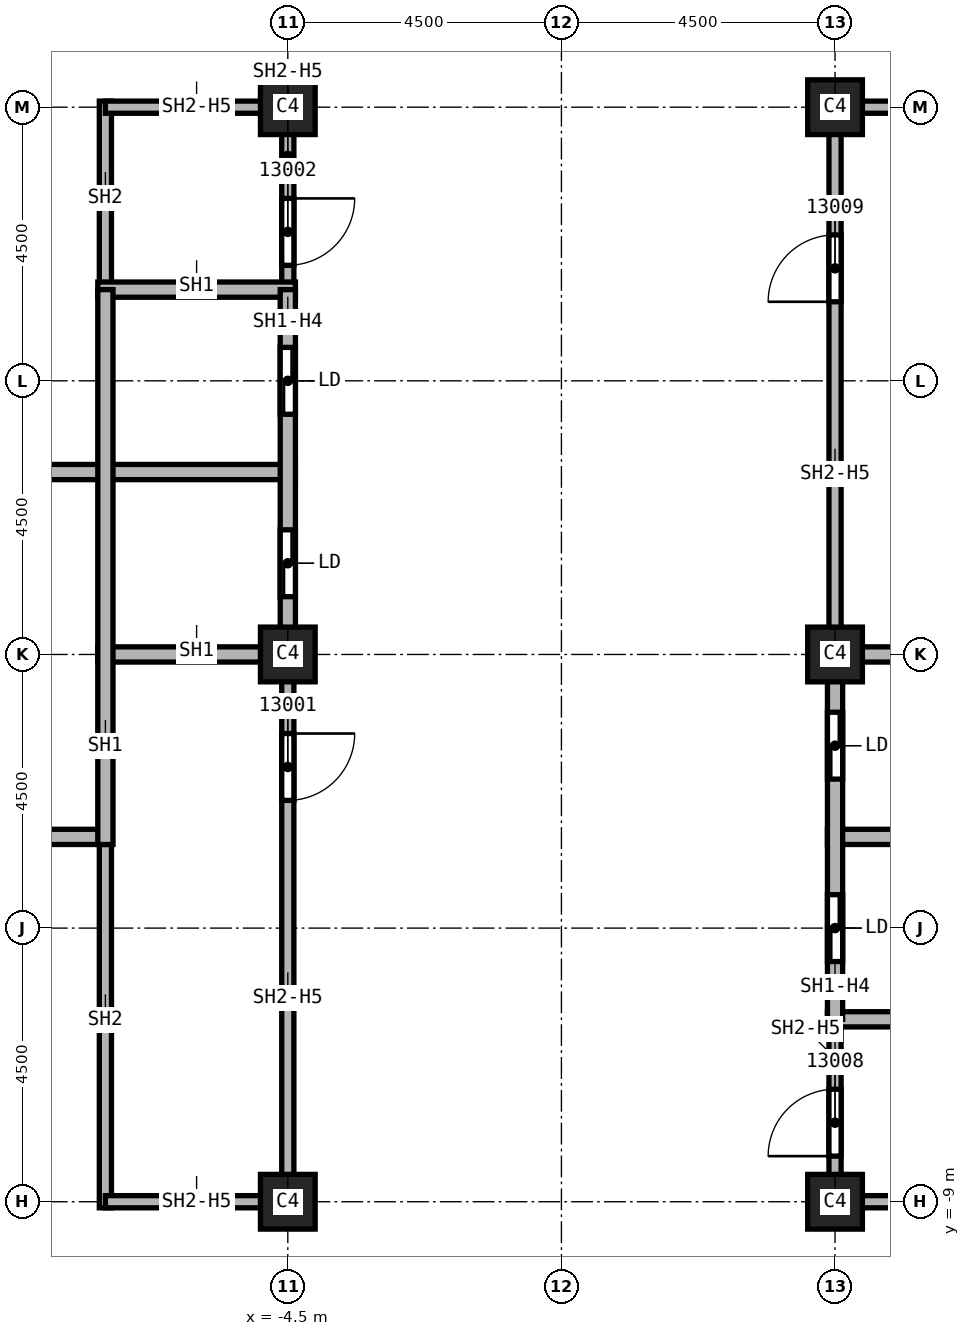
"""IFC4 building model, lengths in metres.
Left out: names, types, materials, properties, quantities, classifications, styles, units other than length and angle.
Written with IfcOpenShell. Run it as: python <this file> out.ifc"""

import sys

from ifc_helpers import new_model, si_unit, direction, frame, frame_2d, origin, origin_2d, place, context, subcontext, project, spatial, rectangle, extrude, element, fill, save


model = new_model("IFC4")
c1 = context("Model", 3, precision=1e-05, world=origin(), true_north=direction((0.0, 1.0)))
c2 = subcontext(c1, "Body", "Model", "MODEL_VIEW")
j1 = project(units=[si_unit("LENGTHUNIT", "METRE"), si_unit("PLANEANGLEUNIT", "RADIAN")], contexts=[c1])
p1 = place(None, origin())
s1 = spatial("IfcSite", under=j1, at=p1, CompositionType="ELEMENT")
p2 = place(p1, origin())
s2 = spatial("IfcBuilding", under=s1, at=p2, CompositionType="ELEMENT")
p3 = place(p2, frame((0.0, 0.0, 208.0)))
s3 = spatial("IfcBuildingStorey", under=s2, at=p3, CompositionType="ELEMENT", Elevation=208.0)
for number, where, z_axis, x_axis in (
    (1, (4.5, 0.0, 0.0), (0.0, 0.0, 1.0), (1.0, 0.0, 0.0)),
    (2, (4.5, 9.0, 0.0), (0.0, 0.0, 1.0), (1.0, 0.0, 0.0)),
    (3, (4.5, -9.0, 0.0), (0.0, 0.0, 1.0), (1.0, 0.0, 0.0)),
    (4, (-4.5, 0.0, 0.0), (0.0, 0.0, 1.0), (1.0, 0.0, 0.0)),
    (5, (-4.5, 9.0, 0.0), (0.0, 0.0, 1.0), (1.0, 0.0, 0.0)),
    (6, (-4.5, -9.0, 0.0), (0.0, 0.0, 1.0), (1.0, 0.0, 0.0)),
):
    element("IfcColumn", number, at=place(p3, frame(where, z_axis=z_axis, x_axis=x_axis)), inside=s3, PredefinedType="COLUMN", context=c2, shape_type="SweptSolid", body=[
        extrude(rectangle(XDim=0.9, YDim=0.9, at=origin_2d()), origin(), (0.0, 0.0, 1.0), 3.72),
    ])
p4 = place(p3, frame((-7.5, -9.1, 0.0), z_axis=(0.0, 0.0, 1.0), x_axis=(0.0, 1.0, 0.0)))
e7 = element("IfcWall", 7, at=p4, inside=s3, PredefinedType="SOLIDWALL", context=c2, shape_type="SweptSolid", body=[
    extrude(rectangle(XDim=6.225, YDim=0.2, at=frame_2d((3.113, 0.0))), origin(), (0.0, 0.0, 1.0), 3.72),
])
p5 = place(p3, frame((-7.5, 6.0, 0.0), z_axis=(0.0, 0.0, 1.0), x_axis=(0.0, 1.0, 0.0)))
e8 = element("IfcWall", 8, at=p5, inside=s3, PredefinedType="SOLIDWALL", context=c2, shape_type="SweptSolid", body=[
    extrude(rectangle(XDim=3.1, YDim=0.2, at=frame_2d((1.55, 0.0))), origin(), (0.0, 0.0, 1.0), 3.72),
])
for number, where, z_axis, x_axis in (
    (9, (-7.5, 9.0, 0.0), (0.0, 0.0, 1.0), (1.0, 0.0, 0.0)),
    (10, (-4.5, -9.0, 0.0), (0.0, 0.0, 1.0), (-1.0, 0.0, 0.0)),
):
    element("IfcWall", number, at=place(p3, frame(where, z_axis=z_axis, x_axis=x_axis)), inside=s3, PredefinedType="SOLIDWALL", context=c2, shape_type="SweptSolid", body=[
        extrude(rectangle(XDim=3.0, YDim=0.2, at=frame_2d((1.5, 0.0))), origin(), (0.0, 0.0, 1.0), 2.958),
    ])
p6 = place(p3, frame((-4.5, 0.0, 0.0), z_axis=(0.0, 0.0, 1.0), x_axis=(0.0, -1.0, 0.0)))
e11 = element("IfcWall", 11, at=p6, inside=s3, PredefinedType="SOLIDWALL", context=c2, shape_type="SweptSolid", body=[
    extrude(rectangle(XDim=9.1, YDim=0.2, at=frame_2d((4.55, 0.0))), origin(), (0.0, 0.0, 1.0), 2.958),
])
p7 = place(p6, frame((1.3, 0.0, 0.0)))
e12 = element("IfcOpeningElement", 12, at=p7, cuts=e11, PredefinedType="OPENING", context=c2, shape_type="SweptSolid", body=[
    extrude(rectangle(XDim=1.1, YDim=2.1, at=frame_2d((0.55, 1.05))), frame((0.0, 0.1, 0.0), z_axis=(0.0, -1.0, 0.0), x_axis=(1.0, 0.0, 0.0)), (0.0, 0.0, 1.0), 0.2),
])
p8 = place(p3, frame((-4.5, 9.1, 0.0), z_axis=(0.0, 0.0, 1.0), x_axis=(0.0, -1.0, 0.0)))
e13 = element("IfcWall", 13, at=p8, inside=s3, PredefinedType="SOLIDWALL", context=c2, shape_type="SweptSolid", body=[
    extrude(rectangle(XDim=3.1, YDim=0.2, at=frame_2d((1.55, 0.0))), origin(), (0.0, 0.0, 1.0), 2.958),
])
p9 = place(p8, frame((1.6, 0.0, 0.0)))
e14 = element("IfcOpeningElement", 14, at=p9, cuts=e13, PredefinedType="OPENING", context=c2, shape_type="SweptSolid", body=[
    extrude(rectangle(XDim=1.1, YDim=2.1, at=frame_2d((0.55, 1.05))), frame((0.0, 0.1, 0.0), z_axis=(0.0, -1.0, 0.0), x_axis=(1.0, 0.0, 0.0)), (0.0, 0.0, 1.0), 0.2),
])
p10 = place(p3, frame((4.5, -9.1, 0.0), z_axis=(0.0, 0.0, 1.0), x_axis=(0.0, 1.0, 0.0)))
e15 = element("IfcWall", 15, at=p10, inside=s3, PredefinedType="SOLIDWALL", context=c2, shape_type="SweptSolid", body=[
    extrude(rectangle(XDim=3.1, YDim=0.2, at=frame_2d((1.55, 0.0))), origin(), (0.0, 0.0, 1.0), 2.958),
])
p11 = place(p10, frame((0.85, 0.0, 0.0)))
e16 = element("IfcOpeningElement", 16, at=p11, cuts=e15, PredefinedType="OPENING", context=c2, shape_type="SweptSolid", body=[
    extrude(rectangle(XDim=1.1, YDim=2.1, at=frame_2d((0.55, 1.05))), frame((0.0, 0.1, 0.0), z_axis=(0.0, -1.0, 0.0), x_axis=(1.0, 0.0, 0.0)), (0.0, 0.0, 1.0), 0.2),
])
p12 = place(p3, frame((4.5, 0.0, 0.0), z_axis=(0.0, 0.0, 1.0), x_axis=(0.0, 1.0, 0.0)))
e17 = element("IfcWall", 17, at=p12, inside=s3, PredefinedType="SOLIDWALL", context=c2, shape_type="SweptSolid", body=[
    extrude(rectangle(XDim=9.1, YDim=0.2, at=frame_2d((4.55, 0.0))), origin(), (0.0, 0.0, 1.0), 2.958),
])
p13 = place(p12, frame((5.8, 0.0, 0.0)))
e18 = element("IfcOpeningElement", 18, at=p13, cuts=e17, PredefinedType="OPENING", context=c2, shape_type="SweptSolid", body=[
    extrude(rectangle(XDim=1.1, YDim=2.1, at=frame_2d((0.55, 1.05))), frame((0.0, 0.1, 0.0), z_axis=(0.0, -1.0, 0.0), x_axis=(1.0, 0.0, 0.0)), (0.0, 0.0, 1.0), 0.2),
])
for number, where, z_axis, x_axis in (
    (19, (4.5, 9.0, 0.0), (0.0, 0.0, 1.0), (1.0, 0.0, 0.0)),
    (20, (7.5, -9.0, 0.0), (0.0, 0.0, 1.0), (-1.0, 0.0, 0.0)),
):
    element("IfcWall", number, at=place(p3, frame(where, z_axis=z_axis, x_axis=x_axis)), inside=s3, PredefinedType="SOLIDWALL", context=c2, shape_type="SweptSolid", body=[
        extrude(rectangle(XDim=3.0, YDim=0.2, at=frame_2d((1.5, 0.0))), origin(), (0.0, 0.0, 1.0), 2.958),
    ])
p14 = place(p3, frame((-13.625, 3.0, 0.0), z_axis=(0.0, 0.0, 1.0), x_axis=(1.0, 0.0, 0.0)))
e21 = element("IfcWall", 21, at=p14, inside=s3, PredefinedType="SOLIDWALL", context=c2, shape_type="SweptSolid", body=[
    extrude(rectangle(XDim=9.25, YDim=0.25, at=frame_2d((4.625, 0.0))), origin(), (0.0, 0.0, 1.0), 3.72),
])
p15 = place(p14, frame((3.25, 0.0, 0.0)))
e22 = element("IfcOpeningElement", 22, at=p15, cuts=e21, PredefinedType="OPENING", context=c2, shape_type="SweptSolid", body=[
    extrude(rectangle(XDim=1.1, YDim=2.1, at=frame_2d((0.55, 1.05))), frame((0.0, 0.125, 0.0), z_axis=(0.0, -1.0, 0.0), x_axis=(1.0, 0.0, 0.0)), (0.0, 0.0, 1.0), 0.25),
])
p16 = place(p3, frame((-13.625, -3.0, 0.0), z_axis=(0.0, 0.0, 1.0), x_axis=(1.0, 0.0, 0.0)))
e23 = element("IfcWall", 23, at=p16, inside=s3, PredefinedType="SOLIDWALL", context=c2, shape_type="SweptSolid", body=[
    extrude(rectangle(XDim=6.125, YDim=0.25, at=frame_2d((3.062, 0.0))), origin(), (0.0, 0.0, 1.0), 3.72),
])
p17 = place(p16, frame((3.25, 0.0, 0.0)))
e24 = element("IfcOpeningElement", 24, at=p17, cuts=e23, PredefinedType="OPENING", context=c2, shape_type="SweptSolid", body=[
    extrude(rectangle(XDim=1.1, YDim=2.1, at=frame_2d((0.55, 1.05))), frame((0.0, 0.125, 0.0), z_axis=(0.0, -1.0, 0.0), x_axis=(1.0, 0.0, 0.0)), (0.0, 0.0, 1.0), 0.25),
])
for number, where, z_axis, x_axis in (
    (25, (-7.625, 0.0, 0.0), (0.0, 0.0, 1.0), (1.0, 0.0, 0.0)),
    (26, (-7.625, 6.0, 0.0), (0.0, 0.0, 1.0), (1.0, 0.0, 0.0)),
):
    element("IfcWall", number, at=place(p3, frame(where, z_axis=z_axis, x_axis=x_axis)), inside=s3, PredefinedType="SOLIDWALL", context=c2, shape_type="SweptSolid", body=[
        extrude(rectangle(XDim=3.25, YDim=0.25, at=frame_2d((1.625, 0.0))), origin(), (0.0, 0.0, 1.0), 3.72),
    ])
p18 = place(p3, frame((-7.5, -3.125, 0.0), z_axis=(0.0, 0.0, 1.0), x_axis=(0.0, 1.0, 0.0)))
e27 = element("IfcWall", 27, at=p18, inside=s3, PredefinedType="SOLIDWALL", context=c2, shape_type="SweptSolid", body=[
    extrude(rectangle(XDim=9.125, YDim=0.25, at=frame_2d((4.562, 0.0))), origin(), (0.0, 0.0, 1.0), 3.72),
])
p19 = place(p3, frame((-4.5, 6.0, 0.0), z_axis=(0.0, 0.0, 1.0), x_axis=(0.0, -1.0, 0.0)))
e28 = element("IfcWall", 28, at=p19, inside=s3, PredefinedType="SOLIDWALL", context=c2, shape_type="SweptSolid", body=[
    extrude(rectangle(XDim=6.0, YDim=0.25, at=frame_2d((3.0, 0.0))), origin(), (0.0, 0.0, 1.0), 2.958),
])
p20 = place(p19, frame((3.95, 0.0, 0.0)))
e29 = element("IfcOpeningElement", 29, at=p20, cuts=e28, PredefinedType="OPENING", context=c2, shape_type="SweptSolid", body=[
    extrude(rectangle(XDim=1.1, YDim=2.1, at=frame_2d((0.55, 1.05))), frame((0.0, 0.125, 0.0), z_axis=(0.0, -1.0, 0.0), x_axis=(1.0, 0.0, 0.0)), (0.0, 0.0, 1.0), 0.25),
])
p21 = place(p19, frame((0.95, 0.0, 0.0)))
e30 = element("IfcOpeningElement", 30, at=p21, cuts=e28, PredefinedType="OPENING", context=c2, shape_type="SweptSolid", body=[
    extrude(rectangle(XDim=1.1, YDim=2.1, at=frame_2d((0.55, 1.05))), frame((0.0, 0.125, 0.0), z_axis=(0.0, -1.0, 0.0), x_axis=(1.0, 0.0, 0.0)), (0.0, 0.0, 1.0), 0.25),
])
p22 = place(p3, frame((4.375, -6.0, 0.0), z_axis=(0.0, 0.0, 1.0), x_axis=(1.0, 0.0, 0.0)))
e31 = element("IfcWall", 31, at=p22, inside=s3, PredefinedType="SOLIDWALL", context=c2, shape_type="SweptSolid", body=[
    extrude(rectangle(XDim=3.25, YDim=0.25, at=frame_2d((1.625, 0.0))), origin(), (0.0, 0.0, 1.0), 3.72),
])
p23 = place(p3, frame((4.375, -3.0, 0.0), z_axis=(0.0, 0.0, 1.0), x_axis=(1.0, 0.0, 0.0)))
e32 = element("IfcWall", 32, at=p23, inside=s3, PredefinedType="SOLIDWALL", context=c2, shape_type="SweptSolid", body=[
    extrude(rectangle(XDim=9.25, YDim=0.25, at=frame_2d((4.625, 0.0))), origin(), (0.0, 0.0, 1.0), 3.72),
])
p24 = place(p23, frame((4.125, 0.0, 0.0)))
e33 = element("IfcOpeningElement", 33, at=p24, cuts=e32, PredefinedType="OPENING", context=c2, shape_type="SweptSolid", body=[
    extrude(rectangle(XDim=1.1, YDim=2.1, at=frame_2d((0.55, 1.05))), frame((0.0, 0.125, 0.0), z_axis=(0.0, -1.0, 0.0), x_axis=(1.0, 0.0, 0.0)), (0.0, 0.0, 1.0), 0.25),
])
p25 = place(p3, frame((4.375, 0.0, 0.0), z_axis=(0.0, 0.0, 1.0), x_axis=(1.0, 0.0, 0.0)))
e34 = element("IfcWall", 34, at=p25, inside=s3, PredefinedType="SOLIDWALL", context=c2, shape_type="SweptSolid", body=[
    extrude(rectangle(XDim=3.25, YDim=0.25, at=frame_2d((1.625, 0.0))), origin(), (0.0, 0.0, 1.0), 3.72),
])
p26 = place(p3, frame((4.5, -6.0, 0.0), z_axis=(0.0, 0.0, 1.0), x_axis=(0.0, 1.0, 0.0)))
e35 = element("IfcWall", 35, at=p26, inside=s3, PredefinedType="SOLIDWALL", context=c2, shape_type="SweptSolid", body=[
    extrude(rectangle(XDim=6.0, YDim=0.25, at=frame_2d((3.0, 0.0))), origin(), (0.0, 0.0, 1.0), 2.958),
])
p27 = place(p26, frame((0.95, 0.0, 0.0)))
e36 = element("IfcOpeningElement", 36, at=p27, cuts=e35, PredefinedType="OPENING", context=c2, shape_type="SweptSolid", body=[
    extrude(rectangle(XDim=1.1, YDim=2.1, at=frame_2d((0.55, 1.05))), frame((0.0, 0.125, 0.0), z_axis=(0.0, -1.0, 0.0), x_axis=(1.0, 0.0, 0.0)), (0.0, 0.0, 1.0), 0.25),
])
p28 = place(p26, frame((3.95, 0.0, 0.0)))
e37 = element("IfcOpeningElement", 37, at=p28, cuts=e35, PredefinedType="OPENING", context=c2, shape_type="SweptSolid", body=[
    extrude(rectangle(XDim=1.1, YDim=2.1, at=frame_2d((0.55, 1.05))), frame((0.0, 0.125, 0.0), z_axis=(0.0, -1.0, 0.0), x_axis=(1.0, 0.0, 0.0)), (0.0, 0.0, 1.0), 0.25),
])
p29 = place(p7, origin())
e38 = element("IfcDoor", 38, at=p29, inside=s3, OperationType="SINGLE_SWING_RIGHT", PredefinedType="DOOR", context=c2, shape_type="SweptSolid", body=[
    extrude(rectangle(XDim=1.1, YDim=2.1, at=frame_2d((0.55, 1.05))), frame((0.0, 0.025, 0.0), z_axis=(0.0, -1.0, 0.0), x_axis=(1.0, 0.0, 0.0)), (0.0, 0.0, 1.0), 0.05),
])
fill(e12, e38)
p30 = place(p9, origin())
e39 = element("IfcDoor", 39, at=p30, inside=s3, OperationType="SINGLE_SWING_LEFT", PredefinedType="DOOR", context=c2, shape_type="SweptSolid", body=[
    extrude(rectangle(XDim=1.1, YDim=2.1, at=frame_2d((0.55, 1.05))), frame((0.0, 0.025, 0.0), z_axis=(0.0, -1.0, 0.0), x_axis=(1.0, 0.0, 0.0)), (0.0, 0.0, 1.0), 0.05),
])
fill(e14, e39)
p31 = place(p11, origin())
e40 = element("IfcDoor", 40, at=p31, inside=s3, OperationType="SINGLE_SWING_LEFT", PredefinedType="DOOR", context=c2, shape_type="SweptSolid", body=[
    extrude(rectangle(XDim=1.1, YDim=2.1, at=frame_2d((0.55, 1.05))), frame((0.0, 0.025, 0.0), z_axis=(0.0, -1.0, 0.0), x_axis=(1.0, 0.0, 0.0)), (0.0, 0.0, 1.0), 0.05),
])
fill(e16, e40)
p32 = place(p13, origin())
e41 = element("IfcDoor", 41, at=p32, inside=s3, OperationType="SINGLE_SWING_RIGHT", PredefinedType="DOOR", context=c2, shape_type="SweptSolid", body=[
    extrude(rectangle(XDim=1.1, YDim=2.1, at=frame_2d((0.55, 1.05))), frame((0.0, 0.025, 0.0), z_axis=(0.0, -1.0, 0.0), x_axis=(1.0, 0.0, 0.0)), (0.0, 0.0, 1.0), 0.05),
])
fill(e18, e41)
p33 = place(p20, origin())
e42 = element("IfcDoor", 42, at=p33, inside=s3, OperationType="SLIDING_TO_LEFT", PredefinedType="DOOR", context=c2, shape_type="SweptSolid", body=[
    extrude(rectangle(XDim=1.1, YDim=2.1, at=frame_2d((0.55, 1.05))), frame((0.0, 0.025, 0.0), z_axis=(0.0, -1.0, 0.0), x_axis=(1.0, 0.0, 0.0)), (0.0, 0.0, 1.0), 0.05),
])
fill(e29, e42)
p34 = place(p21, origin())
e43 = element("IfcDoor", 43, at=p34, inside=s3, OperationType="SLIDING_TO_LEFT", PredefinedType="DOOR", context=c2, shape_type="SweptSolid", body=[
    extrude(rectangle(XDim=1.1, YDim=2.1, at=frame_2d((0.55, 1.05))), frame((0.0, 0.025, 0.0), z_axis=(0.0, -1.0, 0.0), x_axis=(1.0, 0.0, 0.0)), (0.0, 0.0, 1.0), 0.05),
])
fill(e30, e43)
p35 = place(p27, origin())
e44 = element("IfcDoor", 44, at=p35, inside=s3, OperationType="SLIDING_TO_LEFT", PredefinedType="DOOR", context=c2, shape_type="SweptSolid", body=[
    extrude(rectangle(XDim=1.1, YDim=2.1, at=frame_2d((0.55, 1.05))), frame((0.0, 0.025, 0.0), z_axis=(0.0, -1.0, 0.0), x_axis=(1.0, 0.0, 0.0)), (0.0, 0.0, 1.0), 0.05),
])
fill(e36, e44)
p36 = place(p28, origin())
e45 = element("IfcDoor", 45, at=p36, inside=s3, OperationType="SLIDING_TO_LEFT", PredefinedType="DOOR", context=c2, shape_type="SweptSolid", body=[
    extrude(rectangle(XDim=1.1, YDim=2.1, at=frame_2d((0.55, 1.05))), frame((0.0, 0.025, 0.0), z_axis=(0.0, -1.0, 0.0), x_axis=(1.0, 0.0, 0.0)), (0.0, 0.0, 1.0), 0.05),
])
fill(e37, e45)
save(model, sys.argv[1])
